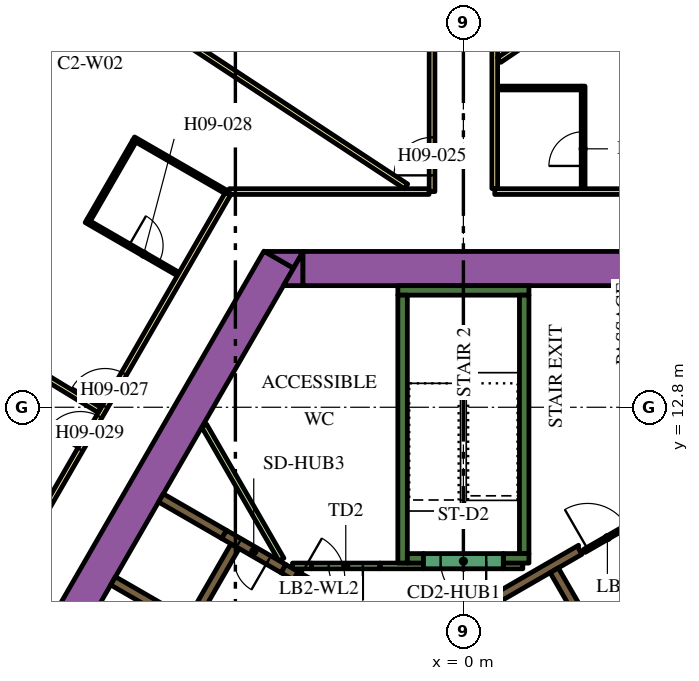
"""IFC4 building model, lengths in metres.
Left out: names, types, materials, properties, quantities, classifications, styles, units other than length and angle.
Written with IfcOpenShell. Run it as: python <this file> out.ifc"""

import sys

from ifc_helpers import new_model, si_unit, direction, frame, frame_2d, origin, place, context, subcontext, project, spatial, polyline, rectangle, outline, extrude, element, fill, save


model = new_model("IFC4")
c1 = context("Model", 3, precision=1e-05, world=origin(), true_north=direction((0.0, 1.0)))
c2 = subcontext(c1, "Body", "Model", "MODEL_VIEW")
j1 = project(units=[si_unit("LENGTHUNIT", "METRE"), si_unit("PLANEANGLEUNIT", "RADIAN")], contexts=[c1])
p1 = place(None, origin())
s1 = spatial("IfcSite", under=j1, at=p1, CompositionType="ELEMENT")
p2 = place(p1, origin())
s2 = spatial("IfcBuilding", under=s1, at=p2, CompositionType="ELEMENT")
p3 = place(p2, frame((0.0, 0.0, 122.7)))
s3 = spatial("IfcBuildingStorey", under=s2, at=p3, CompositionType="ELEMENT", Elevation=122.7)
p4 = place(p3, frame((-15.36, -1.503, 0.0), z_axis=(0.0, 0.0, 1.0), x_axis=(0.50000389221, 0.866023156604, 0.0)))
e1 = element("IfcWall", 1, at=p4, inside=s3, PredefinedType="SOLIDWALL", context=c2, shape_type="SweptSolid", body=[
    extrude(rectangle(XDim=21.0, YDim=0.9, at=frame_2d((10.5, 0.0))), origin(), (0.0, 0.0, 1.0), 3.9),
])
p5 = place(p3, origin())
e2 = element("IfcWall", 2, at=p5, inside=s3, PredefinedType="SOLIDWALL", context=c2, shape_type="SweptSolid", body=[
    extrude(outline(polyline([(-4.215, 16.9), (-4.469, 16.46), (-5.231, 16.9), (-4.215, 16.9)])), origin(), (0.0, 0.0, 1.0), 3.9),
])
p6 = place(p3, frame((-4.224, 16.45, 0.0), z_axis=(0.0, 0.0, 1.0), x_axis=(1.0, 0.0, 0.0)))
e3 = element("IfcWall", 3, at=p6, inside=s3, PredefinedType="SOLIDWALL", context=c2, shape_type="SweptSolid", body=[
    extrude(rectangle(XDim=9.488, YDim=0.9, at=frame_2d((4.744, 0.0))), origin(), (0.0, 0.0, 1.0), 3.9),
])
e4 = element("IfcWall", 4, at=p5, inside=s3, PredefinedType="SOLIDWALL", context=c2, shape_type="SweptSolid", body=[
    extrude(outline(polyline([(-4.734, 16.0), (-4.226, 16.88), (-4.226, 16.0), (-4.734, 16.0)])), origin(), (0.0, 0.0, 1.0), 3.9),
])
p7 = place(p3, frame((-1.725, 15.875, 0.0), z_axis=(0.0, 0.0, 1.0), x_axis=(1.0, 0.0, 0.0)))
e5 = element("IfcWall", 5, at=p7, inside=s3, PredefinedType="SOLIDWALL", context=c2, shape_type="SweptSolid", body=[
    extrude(rectangle(XDim=3.45, YDim=0.25, at=frame_2d((1.725, 0.0))), origin(), (0.0, 0.0, 1.0), 3.9),
])
p8 = place(p3, frame((1.6, 8.95, 0.0), z_axis=(0.0, 0.0, 1.0), x_axis=(0.0, 1.0, 0.0)))
e6 = element("IfcWall", 6, at=p8, inside=s3, PredefinedType="SOLIDWALL", context=c2, shape_type="SweptSolid", body=[
    extrude(rectangle(XDim=6.8, YDim=0.25, at=frame_2d((3.4, 0.0))), origin(), (0.0, 0.0, 1.0), 3.9),
])
p9 = place(p3, frame((1.05, 8.825, 0.0), z_axis=(0.0, 0.0, 1.0), x_axis=(1.0, 0.0, 0.0)))
e7 = element("IfcWall", 7, at=p9, inside=s3, PredefinedType="SOLIDWALL", context=c2, shape_type="SweptSolid", body=[
    extrude(rectangle(XDim=0.675, YDim=0.25, at=frame_2d((0.337, 0.0))), origin(), (0.0, 0.0, 1.0), 3.9),
])
p10 = place(p3, frame((-1.6, 8.7, 0.0), z_axis=(0.0, 0.0, 1.0), x_axis=(0.0, 1.0, 0.0)))
e8 = element("IfcWall", 8, at=p10, inside=s3, PredefinedType="SOLIDWALL", context=c2, shape_type="SweptSolid", body=[
    extrude(rectangle(XDim=7.05, YDim=0.25, at=frame_2d((3.525, 0.0))), origin(), (0.0, 0.0, 1.0), 3.9),
])
p11 = place(p3, frame((-1.475, 8.825, 0.0), z_axis=(0.0, 0.0, 1.0), x_axis=(1.0, 0.0, 0.0)))
e9 = element("IfcWall", 9, at=p11, inside=s3, PredefinedType="SOLIDWALL", context=c2, shape_type="SweptSolid", body=[
    extrude(rectangle(XDim=0.425, YDim=0.25, at=frame_2d((0.212, 0.0))), origin(), (0.0, 0.0, 1.0), 3.9),
])
e10 = element("IfcWall", 10, at=p5, inside=s3, PredefinedType="SOLIDWALL", context=c2, shape_type="SweptSolid", body=[
    extrude(outline(polyline([(2.776, 8.733), (2.499, 8.573), (2.498, 8.573), (2.498, 8.573), (2.282, 8.448), (2.282, 8.448), (0.377, 7.348), (0.16, 7.223), (0.035, 7.439), (3.032, 9.169), (3.03, 9.152), (3.03, 9.133), (3.031, 9.113), (3.035, 9.094), (3.04, 9.075), (3.047, 9.057), (3.056, 9.039), (3.119, 8.931), (2.776, 8.733)])), origin(), (0.0, 0.0, 1.0), 3.9),
])
e11 = element("IfcWall", 11, at=p5, inside=s3, PredefinedType="SOLIDWALL", context=c2, shape_type="SweptSolid", body=[
    extrude(outline(polyline([(-3.128, 7.481), (-3.259, 7.557), (-3.134, 7.773), (-3.003, 7.698), (-3.128, 7.481)])), origin(), (0.0, 0.0, 1.0), 3.9),
])
p12 = place(p3, frame((-7.314, 7.132, 0.0), z_axis=(0.0, 0.0, 1.0), x_axis=(-0.866008176907, 0.50002983664, 0.0)))
e12 = element("IfcWall", 12, at=p12, inside=s3, PredefinedType="SOLIDWALL", context=c2, shape_type="SweptSolid", body=[
    extrude(rectangle(XDim=2.2, YDim=0.25, at=frame_2d((1.1, 0.0))), origin(), (0.0, 0.0, 1.0), 3.9),
])
p13 = place(p3, frame((-6.296, 9.455, 0.0), z_axis=(0.0, 0.0, 1.0), x_axis=(-0.866011930837, 0.500023335103, 0.0)))
e13 = element("IfcWall", 13, at=p13, inside=s3, PredefinedType="SOLIDWALL", context=c2, shape_type="SweptSolid", body=[
    extrude(rectangle(XDim=1.92, YDim=0.25, at=frame_2d((0.96, 0.0))), origin(), (0.0, 0.0, 1.0), 3.9),
])
p14 = place(p3, frame((-4.409, 8.365, 0.0), z_axis=(0.0, 0.0, 1.0), x_axis=(-0.866057014183, 0.499945245186, 0.0)))
e14 = element("IfcWall", 14, at=p14, inside=s3, PredefinedType="SOLIDWALL", context=c2, shape_type="SweptSolid", body=[
    extrude(rectangle(XDim=0.379, YDim=0.25, at=frame_2d((0.19, 0.0))), origin(), (0.0, 0.0, 1.0), 3.9),
])
p15 = place(p3, frame((-2.195, 8.625, 0.0), z_axis=(0.0, 0.0, 1.0), x_axis=(1.0, 0.0, 0.0)))
e15 = element("IfcWall", 15, at=p15, inside=s3, PredefinedType="PARTITIONING", context=c2, shape_type="SweptSolid", body=[
    extrude(rectangle(XDim=1.145, YDim=0.15, at=frame_2d((0.573, 0.0))), origin(), (0.0, 0.0, 1.0), 2.75),
])
p16 = place(p3, frame((-6.823, 12.318, 0.0), z_axis=(0.0, 0.0, 1.0), x_axis=(0.500007885066, -0.866020851292, 0.0)))
e16 = element("IfcWall", 16, at=p16, inside=s3, PredefinedType="PARTITIONING", context=c2, shape_type="SweptSolid", body=[
    extrude(rectangle(XDim=4.072, YDim=0.15, at=frame_2d((2.036, 0.0))), origin(), (0.0, 0.0, 1.0), 2.75),
])
p17 = place(p3, frame((-4.498, 8.625, 0.0), z_axis=(0.0, 0.0, 1.0), x_axis=(1.0, 0.0, 0.0)))
e17 = element("IfcWall", 17, at=p17, inside=s3, PredefinedType="PARTITIONING", context=c2, shape_type="SweptSolid", body=[
    extrude(rectangle(XDim=0.502, YDim=0.15, at=frame_2d((0.251, 0.0))), origin(), (0.0, 0.0, 1.0), 2.75),
])
p18 = place(p3, frame((1.05, 8.625, 0.0), z_axis=(0.0, 0.0, 1.0), x_axis=(1.0, 0.0, 0.0)))
e18 = element("IfcWall", 18, at=p18, inside=s3, PredefinedType="PARTITIONING", context=c2, shape_type="SweptSolid", body=[
    extrude(rectangle(XDim=0.514, YDim=0.15, at=frame_2d((0.257, 0.0))), origin(), (0.0, 0.0, 1.0), 2.75),
])
p19 = place(p3, frame((8.565, -2.185, 0.0), z_axis=(0.0, 0.0, 1.0), x_axis=(-0.499997954832, 0.866026584559, 0.0)))
e19 = element("IfcWall", 19, at=p19, inside=s3, PredefinedType="SOLIDWALL", context=c2, shape_type="SweptSolid", body=[
    extrude(rectangle(XDim=12.35, YDim=0.25, at=frame_2d((6.175, 0.0))), origin(), (0.0, 0.0, 1.0), 3.9),
])
p20 = place(p19, frame((5.725, 0.0, 0.0)))
e20 = element("IfcOpeningElement", 20, at=p20, cuts=e19, PredefinedType="OPENING", context=c2, shape_type="SweptSolid", body=[
    extrude(rectangle(XDim=0.9, YDim=2.1, at=frame_2d((0.45, 1.05))), frame((0.0, 0.135, 0.0), z_axis=(0.0, -1.0, 0.0), x_axis=(1.0, 0.0, 0.0)), (0.0, 0.0, 1.0), 0.27),
])
p21 = place(p3, frame((-6.008, 9.144, 0.0), z_axis=(0.0, 0.0, 1.0), x_axis=(-0.500006956611, -0.866021387346, 0.0)))
e21 = element("IfcWall", 21, at=p21, inside=s3, PredefinedType="SOLIDWALL", context=c2, shape_type="SweptSolid", body=[
    extrude(rectangle(XDim=9.83, YDim=0.25, at=frame_2d((4.915, 0.0))), origin(), (0.0, 0.0, 1.0), 3.9),
])
p22 = place(p21, frame((6.985, 0.0, 0.0)))
e22 = element("IfcOpeningElement", 22, at=p22, cuts=e21, PredefinedType="OPENING", context=c2, shape_type="SweptSolid", body=[
    extrude(rectangle(XDim=0.9, YDim=2.1, at=frame_2d((0.45, 1.05))), frame((0.0, 0.135, 0.0), z_axis=(0.0, -1.0, 0.0), x_axis=(1.0, 0.0, 0.0)), (0.0, 0.0, 1.0), 0.27),
])
p23 = place(p3, frame((1.05, 8.75, 0.0), z_axis=(0.0, 0.0, 1.0), x_axis=(-1.0, 0.0, 0.0)))
e23 = element("IfcWall", 23, at=p23, inside=s3, PredefinedType="SOLIDWALL", context=c2, shape_type="SweptSolid", body=[
    extrude(rectangle(XDim=2.1, YDim=0.4, at=frame_2d((1.05, 0.0))), origin(), (0.0, 0.0, 1.0), 3.9),
])
p24 = place(p23, frame((0.45, 0.0, 0.0)))
e24 = element("IfcOpeningElement", 24, at=p24, cuts=e23, PredefinedType="OPENING", context=c2, shape_type="SweptSolid", body=[
    extrude(rectangle(XDim=1.2, YDim=2.1, at=frame_2d((0.6, 1.05))), frame((0.0, 0.21, 0.0), z_axis=(0.0, -1.0, 0.0), x_axis=(1.0, 0.0, 0.0)), (0.0, 0.0, 1.0), 0.42),
])
p25 = place(p3, frame((-2.195, 8.625, 0.0), z_axis=(0.0, 0.0, 1.0), x_axis=(-1.0, 0.0, 0.0)))
e25 = element("IfcWall", 25, at=p25, inside=s3, PredefinedType="PARTITIONING", context=c2, shape_type="SweptSolid", body=[
    extrude(rectangle(XDim=1.8, YDim=0.15, at=frame_2d((0.9, 0.0))), origin(), (0.0, 0.0, 1.0), 2.75),
])
p26 = place(p25, frame((0.45, 0.0, 0.0)))
e26 = element("IfcOpeningElement", 26, at=p26, cuts=e25, PredefinedType="OPENING", context=c2, shape_type="SweptSolid", body=[
    extrude(rectangle(XDim=0.9, YDim=2.1, at=frame_2d((0.45, 1.05))), frame((0.0, 0.085, 0.0), z_axis=(0.0, -1.0, 0.0), x_axis=(1.0, 0.0, 0.0)), (0.0, 0.0, 1.0), 0.17),
])
p27 = place(p3, frame((3.183, 9.02, 0.0), z_axis=(0.0, 0.0, 1.0), x_axis=(0.866034573852, 0.49998411664, 0.0)))
e27 = element("IfcWall", 27, at=p27, inside=s3, PredefinedType="PARTITIONING", context=c2, shape_type="SweptSolid", body=[
    extrude(rectangle(XDim=1.4, YDim=0.09, at=frame_2d((0.7, 0.0))), origin(), (0.0, 0.0, 1.0), 2.75),
])
p28 = place(p27, frame((0.1, 0.0, 0.0)))
e28 = element("IfcOpeningElement", 28, at=p28, cuts=e27, PredefinedType="OPENING", context=c2, shape_type="SweptSolid", body=[
    extrude(rectangle(XDim=1.2, YDim=2.1, at=frame_2d((0.6, 1.05))), frame((0.0, 0.055, 0.0), z_axis=(0.0, -1.0, 0.0), x_axis=(1.0, 0.0, 0.0)), (0.0, 0.0, 1.0), 0.11),
])
p29 = place(p3, frame((-4.409, 8.365, 0.0), z_axis=(0.0, 0.0, 1.0), x_axis=(0.866034573852, -0.49998411664, 0.0)))
e29 = element("IfcWall", 29, at=p29, inside=s3, PredefinedType="SOLIDWALL", context=c2, shape_type="SweptSolid", body=[
    extrude(rectangle(XDim=1.4, YDim=0.25, at=frame_2d((0.7, 0.0))), origin(), (0.0, 0.0, 1.0), 3.9),
])
p30 = place(p29, frame((0.1, 0.0, 0.0)))
e30 = element("IfcOpeningElement", 30, at=p30, cuts=e29, PredefinedType="OPENING", context=c2, shape_type="SweptSolid", body=[
    extrude(rectangle(XDim=1.2, YDim=2.1, at=frame_2d((0.6, 1.05))), frame((0.0, 0.135, 0.0), z_axis=(0.0, -1.0, 0.0), x_axis=(1.0, 0.0, 0.0)), (0.0, 0.0, 1.0), 0.27),
])
p31 = place(p3, frame((-4.737, 8.555, 0.0), z_axis=(0.0, 0.0, 1.0), x_axis=(-0.865989075817, 0.500062916607, 0.0)))
e31 = element("IfcWall", 31, at=p31, inside=s3, PredefinedType="SOLIDWALL", context=c2, shape_type="SweptSolid", body=[
    extrude(rectangle(XDim=1.8, YDim=0.25, at=frame_2d((0.9, 0.0))), origin(), (0.0, 0.0, 1.0), 3.9),
])
p32 = place(p31, frame((0.45, 0.0, 0.0)))
e32 = element("IfcOpeningElement", 32, at=p32, cuts=e31, PredefinedType="OPENING", context=c2, shape_type="SweptSolid", body=[
    extrude(rectangle(XDim=0.9, YDim=2.1, at=frame_2d((0.45, 1.05))), frame((0.0, 0.135, 0.0), z_axis=(0.0, -1.0, 0.0), x_axis=(1.0, 0.0, 0.0)), (0.0, 0.0, 1.0), 0.27),
])
p33 = place(p3, frame((0.825, 18.475, 0.0), z_axis=(0.0, 0.0, 1.0), x_axis=(1.0, 0.0, 0.0)))
e33 = element("IfcWall", 33, at=p33, inside=s3, PredefinedType="PARTITIONING", context=c2, shape_type="SweptSolid", body=[
    extrude(rectangle(XDim=5.268, YDim=0.15, at=frame_2d((2.634, 0.0))), origin(), (0.0, 0.0, 1.0), 2.75),
])
p34 = place(p33, frame((4.088, 0.0, 0.0)))
e34 = element("IfcOpeningElement", 34, at=p34, cuts=e33, PredefinedType="OPENING", context=c2, shape_type="SweptSolid", body=[
    extrude(rectangle(XDim=1.0, YDim=2.1, at=frame_2d((0.5, 1.05))), frame((0.0, 0.085, 0.0), z_axis=(0.0, -1.0, 0.0), x_axis=(1.0, 0.0, 0.0)), (0.0, 0.0, 1.0), 0.17),
])
p35 = place(p3, frame((0.825, 32.098, 0.0), z_axis=(0.0, 0.0, 1.0), x_axis=(0.0, -1.0, 0.0)))
e35 = element("IfcWall", 35, at=p35, inside=s3, PredefinedType="PARTITIONING", context=c2, shape_type="SweptSolid", body=[
    extrude(rectangle(XDim=13.543, YDim=0.15, at=frame_2d((6.772, 0.0))), origin(), (0.0, 0.0, 1.0), 2.75),
])
p36 = place(p35, frame((8.49, 0.0, 0.0)))
e36 = element("IfcOpeningElement", 36, at=p36, cuts=e35, PredefinedType="OPENING", context=c2, shape_type="SweptSolid", body=[
    extrude(rectangle(XDim=1.0, YDim=2.1, at=frame_2d((0.5, 1.05))), frame((0.0, 0.085, 0.0), z_axis=(0.0, -1.0, 0.0), x_axis=(1.0, 0.0, 0.0)), (0.0, 0.0, 1.0), 0.17),
])
p37 = place(p3, frame((-0.825, 18.475, 0.0), z_axis=(0.0, 0.0, 1.0), x_axis=(0.0, 1.0, 0.0)))
e37 = element("IfcWall", 37, at=p37, inside=s3, PredefinedType="PARTITIONING", context=c2, shape_type="SweptSolid", body=[
    extrude(rectangle(XDim=13.623, YDim=0.15, at=frame_2d((6.812, 0.0))), origin(), (0.0, 0.0, 1.0), 2.75),
])
p38 = place(p37, frame((0.427, 0.0, 0.0)))
e38 = element("IfcOpeningElement", 38, at=p38, cuts=e37, PredefinedType="OPENING", context=c2, shape_type="SweptSolid", body=[
    extrude(rectangle(XDim=1.0, YDim=2.1, at=frame_2d((0.5, 1.05))), frame((0.0, 0.085, 0.0), z_axis=(0.0, -1.0, 0.0), x_axis=(1.0, 0.0, 0.0)), (0.0, 0.0, 1.0), 0.17),
])
p39 = place(p3, frame((-6.163, 18.475, 0.0), z_axis=(0.0, 0.0, 1.0), x_axis=(1.0, 0.0, 0.0)))
e39 = element("IfcWall", 39, at=p39, inside=s3, PredefinedType="PARTITIONING", context=c2, shape_type="SweptSolid", body=[
    extrude(rectangle(XDim=5.258, YDim=0.15, at=frame_2d((2.629, 0.0))), origin(), (0.0, 0.0, 1.0), 2.75),
])
p40 = place(p3, frame((-19.081, -3.9, 0.0), z_axis=(0.0, 0.0, 1.0), x_axis=(0.499998313975, 0.866026377209, 0.0)))
e40 = element("IfcWall", 40, at=p40, inside=s3, PredefinedType="PARTITIONING", context=c2, shape_type="SweptSolid", body=[
    extrude(rectangle(XDim=25.766, YDim=0.15, at=frame_2d((12.883, 0.0))), origin(), (0.0, 0.0, 1.0), 2.75),
])
p41 = place(p40, frame((19.306, 0.0, 0.0)))
e41 = element("IfcOpeningElement", 41, at=p41, cuts=e40, PredefinedType="OPENING", context=c2, shape_type="SweptSolid", body=[
    extrude(rectangle(XDim=1.0, YDim=2.1, at=frame_2d((0.5, 1.05))), frame((0.0, 0.085, 0.0), z_axis=(0.0, -1.0, 0.0), x_axis=(1.0, 0.0, 0.0)), (0.0, 0.0, 1.0), 0.17),
])
p42 = place(p40, frame((18.0, 0.0, 0.0)))
e42 = element("IfcOpeningElement", 42, at=p42, cuts=e40, PredefinedType="OPENING", context=c2, shape_type="SweptSolid", body=[
    extrude(rectangle(XDim=1.0, YDim=2.1, at=frame_2d((0.5, 1.05))), frame((0.0, 0.085, 0.0), z_axis=(0.0, -1.0, 0.0), x_axis=(1.0, 0.0, 0.0)), (0.0, 0.0, 1.0), 0.17),
])
p43 = place(p40, frame((7.793, 0.0, 0.0)))
e43 = element("IfcOpeningElement", 43, at=p43, cuts=e40, PredefinedType="OPENING", context=c2, shape_type="SweptSolid", body=[
    extrude(rectangle(XDim=0.9, YDim=2.1, at=frame_2d((0.45, 1.05))), frame((0.0, 0.085, 0.0), z_axis=(0.0, -1.0, 0.0), x_axis=(1.0, 0.0, 0.0)), (0.0, 0.0, 1.0), 0.17),
])
p44 = place(p40, frame((4.674, 0.0, 0.0)))
e44 = element("IfcOpeningElement", 44, at=p44, cuts=e40, PredefinedType="OPENING", context=c2, shape_type="SweptSolid", body=[
    extrude(rectangle(XDim=0.9, YDim=2.1, at=frame_2d((0.45, 1.05))), frame((0.0, 0.085, 0.0), z_axis=(0.0, -1.0, 0.0), x_axis=(1.0, 0.0, 0.0)), (0.0, 0.0, 1.0), 0.17),
])
p45 = place(p40, frame((0.18, 0.0, 0.0)))
e45 = element("IfcOpeningElement", 45, at=p45, cuts=e40, PredefinedType="OPENING", context=c2, shape_type="SweptSolid", body=[
    extrude(rectangle(XDim=1.0, YDim=2.1, at=frame_2d((0.5, 1.05))), frame((0.0, 0.085, 0.0), z_axis=(0.0, -1.0, 0.0), x_axis=(1.0, 0.0, 0.0)), (0.0, 0.0, 1.0), 0.17),
])
p46 = place(p3, frame((-15.225, 16.167, 0.0), z_axis=(0.0, 0.0, 1.0), x_axis=(0.854088713274, -0.520127359266, 0.0)))
e46 = element("IfcWall", 46, at=p46, inside=s3, PredefinedType="PARTITIONING", context=c2, shape_type="SweptSolid", body=[
    extrude(rectangle(XDim=6.611, YDim=0.15, at=frame_2d((3.305, 0.0))), origin(), (0.0, 0.0, 1.0), 2.75),
])
p47 = place(p3, frame((-10.592, 24.589, 0.0), z_axis=(0.0, 0.0, 1.0), x_axis=(0.835337323748, -0.549737715236, 0.0)))
e47 = element("IfcWall", 47, at=p47, inside=s3, PredefinedType="PARTITIONING", context=c2, shape_type="SweptSolid", body=[
    extrude(rectangle(XDim=10.875, YDim=0.15, at=frame_2d((5.438, 0.0))), origin(), (0.0, 0.0, 1.0), 2.75),
])
p48 = place(p3, frame((8.326, 26.923, 0.0), z_axis=(0.0, 0.0, 1.0), x_axis=(-0.828836601893, -0.5594907393, 0.0)))
e48 = element("IfcWall", 48, at=p48, inside=s3, PredefinedType="PARTITIONING", context=c2, shape_type="SweptSolid", body=[
    extrude(rectangle(XDim=8.909, YDim=0.15, at=frame_2d((4.455, 0.0))), origin(), (0.0, 0.0, 1.0), 2.75),
])
p49 = place(p3, frame((3.151, 18.55, 0.0), z_axis=(0.0, 0.0, 1.0), x_axis=(0.0, 1.0, 0.0)))
e49 = element("IfcWall", 49, at=p49, inside=s3, PredefinedType="PARTITIONING", context=c2, shape_type="SweptSolid", body=[
    extrude(rectangle(XDim=2.7, YDim=0.1, at=frame_2d((1.35, 0.0))), origin(), (0.0, 0.0, 1.0), 2.75),
])
p50 = place(p49, frame((0.6, 0.0, 0.0)))
e50 = element("IfcOpeningElement", 50, at=p50, cuts=e49, PredefinedType="OPENING", context=c2, shape_type="SweptSolid", body=[
    extrude(rectangle(XDim=0.9, YDim=2.1, at=frame_2d((0.45, 1.05))), frame((0.0, 0.06, 0.0), z_axis=(0.0, -1.0, 0.0), x_axis=(1.0, 0.0, 0.0)), (0.0, 0.0, 1.0), 0.12),
])
p51 = place(p3, frame((3.101, 21.2, 0.0), z_axis=(0.0, 0.0, 1.0), x_axis=(-1.0, 0.0, 0.0)))
e51 = element("IfcWall", 51, at=p51, inside=s3, PredefinedType="PARTITIONING", context=c2, shape_type="SweptSolid", body=[
    extrude(rectangle(XDim=2.2, YDim=0.1, at=frame_2d((1.1, 0.0))), origin(), (0.0, 0.0, 1.0), 2.75),
])
p52 = place(p3, frame((-9.928, 17.704, 0.0), z_axis=(0.0, 0.0, 1.0), x_axis=(0.866034573852, -0.49998411664, 0.0)))
e52 = element("IfcWall", 52, at=p52, inside=s3, PredefinedType="PARTITIONING", context=c2, shape_type="SweptSolid", body=[
    extrude(rectangle(XDim=2.8, YDim=0.1, at=frame_2d((1.4, 0.0))), origin(), (0.0, 0.0, 1.0), 2.75),
])
p53 = place(p52, frame((1.3, 0.0, 0.0)))
e53 = element("IfcOpeningElement", 53, at=p53, cuts=e52, PredefinedType="OPENING", context=c2, shape_type="SweptSolid", body=[
    extrude(rectangle(XDim=0.9, YDim=2.1, at=frame_2d((0.45, 1.05))), frame((0.0, 0.06, 0.0), z_axis=(0.0, -1.0, 0.0), x_axis=(1.0, 0.0, 0.0)), (0.0, 0.0, 1.0), 0.12),
])
p54 = place(p3, frame((-9.86, 17.722, 0.0), z_axis=(0.0, 0.0, 1.0), x_axis=(0.500001309137, 0.866024647952, 0.0)))
e54 = element("IfcWall", 54, at=p54, inside=s3, PredefinedType="PARTITIONING", context=c2, shape_type="SweptSolid", body=[
    extrude(rectangle(XDim=2.4, YDim=0.1, at=frame_2d((1.2, 0.0))), origin(), (0.0, 0.0, 1.0), 2.75),
])
p55 = place(p3, frame((-6.253, 18.469, 0.0), z_axis=(0.0, 0.0, 1.0), x_axis=(-0.866034573852, 0.49998411664, 0.0)))
e55 = element("IfcWall", 55, at=p55, inside=s3, PredefinedType="PARTITIONING", context=c2, shape_type="SweptSolid", body=[
    extrude(rectangle(XDim=2.8, YDim=0.1, at=frame_2d((1.4, 0.0))), origin(), (0.0, 0.0, 1.0), 2.75),
])
p56 = place(p24, origin())
e56 = element("IfcDoor", 56, at=p56, inside=s3, OperationType="SINGLE_SWING_LEFT", PredefinedType="DOOR", context=c2, shape_type="SweptSolid", body=[
    extrude(rectangle(XDim=1.2, YDim=2.1, at=frame_2d((0.6, 1.05))), frame((0.0, 0.025, 0.0), z_axis=(0.0, -1.0, 0.0), x_axis=(1.0, 0.0, 0.0)), (0.0, 0.0, 1.0), 0.05),
])
fill(e24, e56)
p57 = place(p26, origin())
e57 = element("IfcDoor", 57, at=p57, inside=s3, OperationType="SINGLE_SWING_LEFT", PredefinedType="DOOR", context=c2, shape_type="SweptSolid", body=[
    extrude(rectangle(XDim=0.9, YDim=2.1, at=frame_2d((0.45, 1.05))), frame((0.0, 0.025, 0.0), z_axis=(0.0, -1.0, 0.0), x_axis=(1.0, 0.0, 0.0)), (0.0, 0.0, 1.0), 0.05),
])
fill(e26, e57)
p58 = place(p28, origin())
e58 = element("IfcDoor", 58, at=p58, inside=s3, OperationType="SINGLE_SWING_LEFT", PredefinedType="DOOR", context=c2, shape_type="SweptSolid", body=[
    extrude(rectangle(XDim=1.2, YDim=2.1, at=frame_2d((0.6, 1.05))), frame((0.0, 0.025, 0.0), z_axis=(0.0, -1.0, 0.0), x_axis=(1.0, 0.0, 0.0)), (0.0, 0.0, 1.0), 0.05),
])
fill(e28, e58)
p59 = place(p30, origin())
e59 = element("IfcDoor", 59, at=p59, inside=s3, OperationType="SINGLE_SWING_LEFT", PredefinedType="DOOR", context=c2, shape_type="SweptSolid", body=[
    extrude(rectangle(XDim=1.2, YDim=2.1, at=frame_2d((0.6, 1.05))), frame((0.0, 0.025, 0.0), z_axis=(0.0, -1.0, 0.0), x_axis=(1.0, 0.0, 0.0)), (0.0, 0.0, 1.0), 0.05),
])
fill(e30, e59)
p60 = place(p32, origin())
e60 = element("IfcDoor", 60, at=p60, inside=s3, OperationType="SINGLE_SWING_LEFT", PredefinedType="DOOR", context=c2, shape_type="SweptSolid", body=[
    extrude(rectangle(XDim=0.9, YDim=2.1, at=frame_2d((0.45, 1.05))), frame((0.0, 0.025, 0.0), z_axis=(0.0, -1.0, 0.0), x_axis=(1.0, 0.0, 0.0)), (0.0, 0.0, 1.0), 0.05),
])
fill(e32, e60)
p61 = place(p50, origin())
e61 = element("IfcDoor", 61, at=p61, inside=s3, OperationType="SINGLE_SWING_LEFT", PredefinedType="DOOR", context=c2, shape_type="SweptSolid", body=[
    extrude(rectangle(XDim=0.9, YDim=2.1, at=frame_2d((0.45, 1.05))), frame((0.0, 0.025, 0.0), z_axis=(0.0, -1.0, 0.0), x_axis=(1.0, 0.0, 0.0)), (0.0, 0.0, 1.0), 0.05),
])
fill(e50, e61)
p62 = place(p38, origin())
e62 = element("IfcDoor", 62, at=p62, inside=s3, OperationType="SINGLE_SWING_LEFT", PredefinedType="DOOR", context=c2, shape_type="SweptSolid", body=[
    extrude(rectangle(XDim=1.0, YDim=2.1, at=frame_2d((0.5, 1.05))), frame((0.0, 0.025, 0.0), z_axis=(0.0, -1.0, 0.0), x_axis=(1.0, 0.0, 0.0)), (0.0, 0.0, 1.0), 0.05),
])
fill(e38, e62)
p63 = place(p41, origin())
e63 = element("IfcDoor", 63, at=p63, inside=s3, OperationType="SINGLE_SWING_LEFT", PredefinedType="DOOR", context=c2, shape_type="SweptSolid", body=[
    extrude(rectangle(XDim=1.0, YDim=2.1, at=frame_2d((0.5, 1.05))), frame((0.0, 0.025, 0.0), z_axis=(0.0, -1.0, 0.0), x_axis=(1.0, 0.0, 0.0)), (0.0, 0.0, 1.0), 0.05),
])
fill(e41, e63)
p64 = place(p53, origin())
e64 = element("IfcDoor", 64, at=p64, inside=s3, OperationType="SINGLE_SWING_LEFT", PredefinedType="DOOR", context=c2, shape_type="SweptSolid", body=[
    extrude(rectangle(XDim=0.9, YDim=2.1, at=frame_2d((0.45, 1.05))), frame((0.0, 0.025, 0.0), z_axis=(0.0, -1.0, 0.0), x_axis=(1.0, 0.0, 0.0)), (0.0, 0.0, 1.0), 0.05),
])
fill(e53, e64)
p65 = place(p42, origin())
e65 = element("IfcDoor", 65, at=p65, inside=s3, OperationType="SINGLE_SWING_RIGHT", PredefinedType="DOOR", context=c2, shape_type="SweptSolid", body=[
    extrude(rectangle(XDim=1.0, YDim=2.1, at=frame_2d((0.5, 1.05))), frame((0.0, 0.025, 0.0), z_axis=(0.0, -1.0, 0.0), x_axis=(1.0, 0.0, 0.0)), (0.0, 0.0, 1.0), 0.05),
])
fill(e42, e65)
save(model, sys.argv[1])
